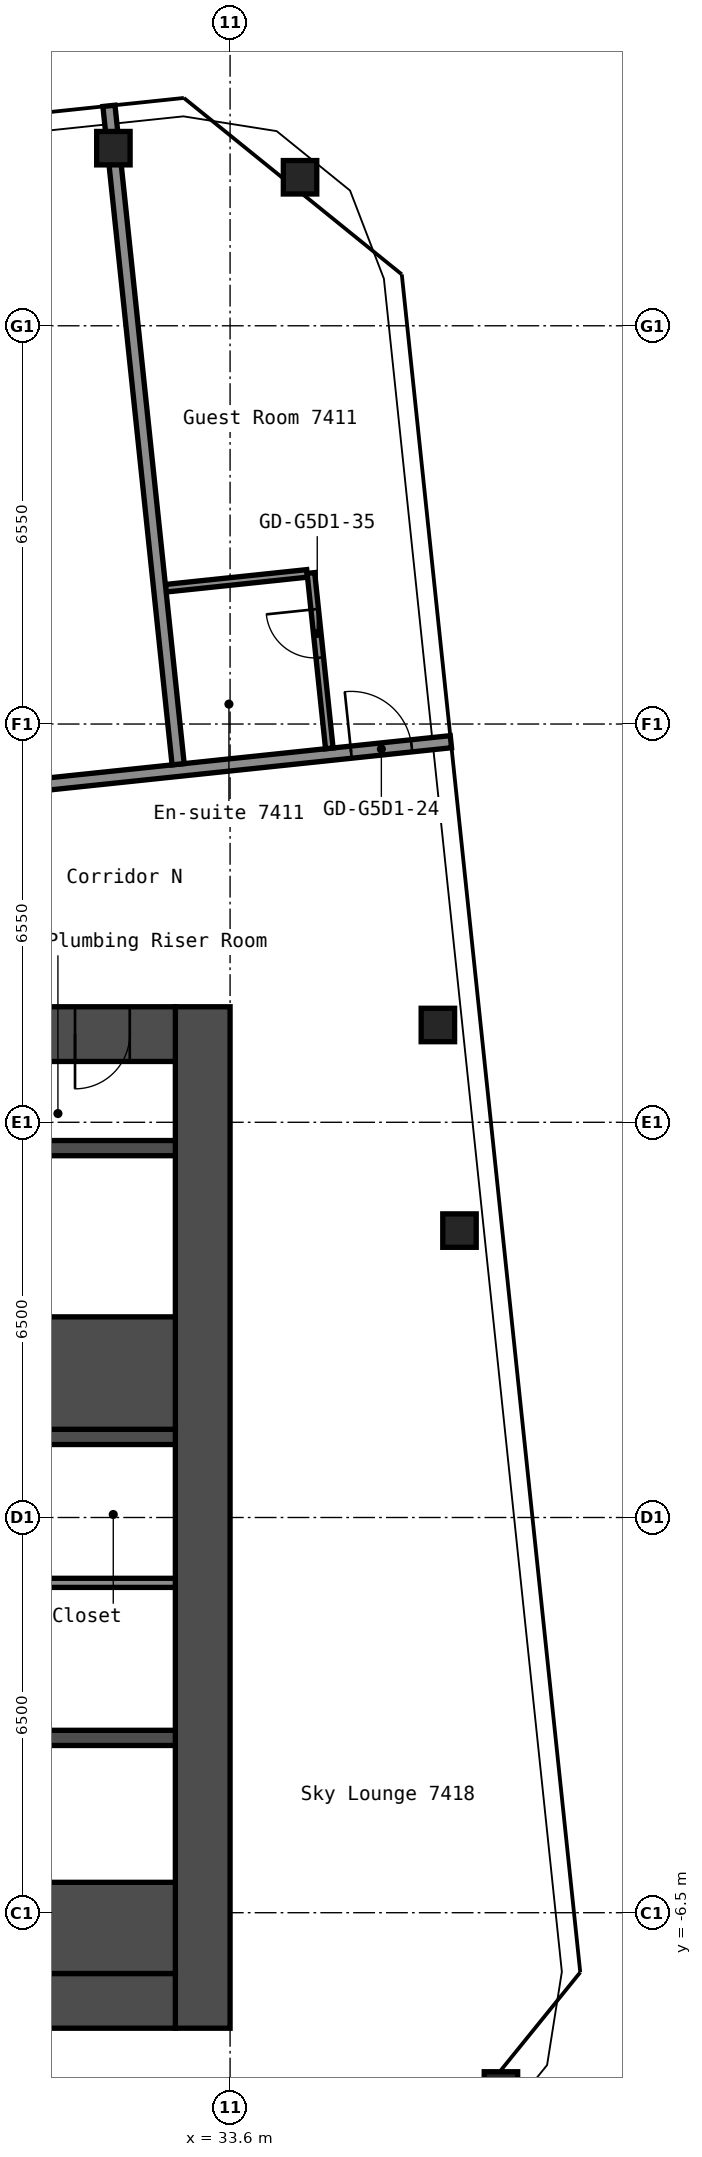
"""IFC4 building model, lengths in metres.
Left out: names, types, materials, properties, quantities, classifications, styles, units other than length and angle.
Written with IfcOpenShell. Run it as: python <this file> out.ifc"""

import sys

from ifc_helpers import new_model, si_unit, direction, frame, frame_2d, origin, origin_2d, place, context, subcontext, project, spatial, rectangle, hollow_rectangle, extrude, element, fill, save


model = new_model("IFC4")
c1 = context("Model", 3, precision=1e-05, world=origin(), true_north=direction((0.0, 1.0)))
c2 = subcontext(c1, "Body", "Model", "MODEL_VIEW")
j1 = project(units=[si_unit("LENGTHUNIT", "METRE"), si_unit("PLANEANGLEUNIT", "RADIAN")], contexts=[c1])
p1 = place(None, origin())
s1 = spatial("IfcSite", under=j1, at=p1, CompositionType="ELEMENT")
p2 = place(p1, origin())
s2 = spatial("IfcBuilding", under=s1, at=p2, CompositionType="ELEMENT")
p3 = place(p2, frame((0.0, 0.0, 261.4)))
s3 = spatial("IfcBuildingStorey", under=s2, at=p3, CompositionType="ELEMENT", Elevation=261.4)
for number, where, z_axis, x_axis in (
    (1, (31.681, 22.521, 0.0), (0.0, 0.0, 1.0), (1.0, 0.0, 0.0)),
    (2, (38.054, -9.39, 0.0), (0.0, 0.0, 1.0), (1.0, 0.0, 0.0)),
    (3, (37.373, 4.719, 0.0), (0.0, 0.0, 1.0), (1.0, 0.0, 0.0)),
    (4, (37.017, 8.1, 0.0), (0.0, 0.0, 1.0), (1.0, 0.0, 0.0)),
    (5, (34.751, 22.042, 0.0), (0.0, 0.0, 1.0), (1.0, 0.0, 0.0)),
):
    element("IfcColumn", number, at=place(p3, frame(where, z_axis=z_axis, x_axis=x_axis)), inside=s3, PredefinedType="COLUMN", context=c2, shape_type="SweptSolid", body=[
        extrude(hollow_rectangle(XDim=0.55, YDim=0.55, WallThickness=0.022, InnerFilletRadius=0.033, OuterFilletRadius=0.055, at=origin_2d()), origin(), (0.0, 0.0, 1.0), 2.75),
    ])
p4 = place(p3, frame((33.15, -8.4, 0.0), z_axis=(0.0, 0.0, 1.0), x_axis=(0.0, 1.0, 0.0)))
e6 = element("IfcWall", 6, at=p4, inside=s3, PredefinedType="SHEAR", context=c2, shape_type="SweptSolid", body=[
    extrude(rectangle(XDim=16.8, YDim=0.9, at=frame_2d((8.4, 0.0))), origin(), (0.0, 0.0, 1.0), 2.75),
])
p5 = place(p3, frame((17.7, 7.95, 0.0), z_axis=(0.0, 0.0, 1.0), x_axis=(1.0, 0.0, 0.0)))
e7 = element("IfcWall", 7, at=p5, inside=s3, PredefinedType="SHEAR", context=c2, shape_type="SweptSolid", body=[
    extrude(rectangle(XDim=15.0, YDim=0.9, at=frame_2d((7.5, 0.0))), origin(), (0.0, 0.0, 1.0), 2.75),
])
p6 = place(p5, frame((10.4, 0.0, 0.0)))
e8 = element("IfcOpeningElement", 8, at=p6, cuts=e7, PredefinedType="OPENING", context=c2, shape_type="SweptSolid", body=[
    extrude(rectangle(XDim=1.2, YDim=2.1, at=frame_2d((0.6, 1.05))), frame((0.0, 0.46, 0.0), z_axis=(0.0, -1.0, 0.0), x_axis=(1.0, 0.0, 0.0)), (0.0, 0.0, 1.0), 0.92),
])
p7 = place(p5, frame((13.35, 0.0, 0.0)))
e9 = element("IfcOpeningElement", 9, at=p7, cuts=e7, PredefinedType="OPENING", context=c2, shape_type="SweptSolid", body=[
    extrude(rectangle(XDim=0.9, YDim=2.1, at=frame_2d((0.45, 1.05))), frame((0.0, 0.46, 0.0), z_axis=(0.0, -1.0, 0.0), x_axis=(1.0, 0.0, 0.0)), (0.0, 0.0, 1.0), 0.92),
])
p8 = place(p3, frame((17.7, -7.95, 0.0), z_axis=(0.0, 0.0, 1.0), x_axis=(1.0, 0.0, 0.0)))
e10 = element("IfcWall", 10, at=p8, inside=s3, PredefinedType="SHEAR", context=c2, shape_type="SweptSolid", body=[
    extrude(rectangle(XDim=15.0, YDim=0.9, at=frame_2d((7.5, 0.0))), origin(), (0.0, 0.0, 1.0), 2.75),
])
p9 = place(p8, frame((2.55, 0.0, 0.0)))
e11 = element("IfcOpeningElement", 11, at=p9, cuts=e10, PredefinedType="OPENING", context=c2, shape_type="SweptSolid", body=[
    extrude(rectangle(XDim=1.0, YDim=2.1, at=frame_2d((0.5, 1.05))), frame((0.0, 0.46, 0.0), z_axis=(0.0, -1.0, 0.0), x_axis=(1.0, 0.0, 0.0)), (0.0, 0.0, 1.0), 0.92),
])
p10 = place(p3, frame((27.65, 1.325, 0.0), z_axis=(0.0, 0.0, 1.0), x_axis=(1.0, 0.0, 0.0)))
e12 = element("IfcWall", 12, at=p10, inside=s3, PredefinedType="SHEAR", context=c2, shape_type="SweptSolid", body=[
    extrude(rectangle(XDim=5.05, YDim=0.25, at=frame_2d((2.525, 0.0))), origin(), (0.0, 0.0, 1.0), 2.75),
])
p11 = place(p10, frame((0.55, 0.0, 0.0)))
e13 = element("IfcOpeningElement", 13, at=p11, cuts=e12, PredefinedType="OPENING", context=c2, shape_type="SweptSolid", body=[
    extrude(rectangle(XDim=1.2, YDim=2.1, at=frame_2d((0.6, 1.05))), frame((0.0, 0.135, 0.0), z_axis=(0.0, -1.0, 0.0), x_axis=(1.0, 0.0, 0.0)), (0.0, 0.0, 1.0), 0.27),
])
p12 = place(p3, frame((30.3, 2.375, 0.0), z_axis=(0.0, 0.0, 1.0), x_axis=(1.0, 0.0, 0.0)))
e14 = element("IfcWall", 14, at=p12, inside=s3, PredefinedType="SHEAR", context=c2, shape_type="SweptSolid", body=[
    extrude(rectangle(XDim=2.4, YDim=1.85, at=frame_2d((1.2, 0.0))), origin(), (0.0, 0.0, 1.0), 2.75),
])
p13 = place(p3, frame((30.3, 6.075, 0.0), z_axis=(0.0, 0.0, 1.0), x_axis=(1.0, 0.0, 0.0)))
e15 = element("IfcWall", 15, at=p13, inside=s3, PredefinedType="SHEAR", context=c2, shape_type="SweptSolid", body=[
    extrude(rectangle(XDim=2.4, YDim=0.25, at=frame_2d((1.2, 0.0))), origin(), (0.0, 0.0, 1.0), 2.75),
])
p14 = place(p3, frame((28.15, -3.625, 0.0), z_axis=(0.0, 0.0, 1.0), x_axis=(1.0, 0.0, 0.0)))
e16 = element("IfcWall", 16, at=p14, inside=s3, PredefinedType="SHEAR", context=c2, shape_type="SweptSolid", body=[
    extrude(rectangle(XDim=4.55, YDim=0.25, at=frame_2d((2.275, 0.0))), origin(), (0.0, 0.0, 1.0), 2.75),
])
p15 = place(p3, frame((28.15, -6.75, 0.0), z_axis=(0.0, 0.0, 1.0), x_axis=(1.0, 0.0, 0.0)))
e17 = element("IfcWall", 17, at=p15, inside=s3, PredefinedType="SHEAR", context=c2, shape_type="SweptSolid", body=[
    extrude(rectangle(XDim=4.55, YDim=1.5, at=frame_2d((2.275, 0.0))), origin(), (0.0, 0.0, 1.0), 2.75),
])
p16 = place(p3, frame((29.7, -1.075, 0.0), z_axis=(0.0, 0.0, 1.0), x_axis=(1.0, 0.0, 0.0)))
e18 = element("IfcWall", 18, at=p16, inside=s3, PredefinedType="PARTITIONING", context=c2, shape_type="SweptSolid", body=[
    extrude(rectangle(XDim=3.0, YDim=0.15, at=frame_2d((1.5, 0.0))), origin(), (0.0, 0.0, 1.0), 2.75),
])
p17 = place(p3, frame((16.048, 10.533, 0.0), z_axis=(0.0, 0.0, 1.0), x_axis=(0.994522460242, 0.104523088709, 0.0)))
e19 = element("IfcWall", 19, at=p17, inside=s3, PredefinedType="PARTITIONING", context=c2, shape_type="SweptSolid", body=[
    extrude(rectangle(XDim=21.3, YDim=0.2, at=frame_2d((10.65, 0.0))), origin(), (0.0, 0.0, 1.0), 2.75),
])
p18 = place(p17, frame((3.4, 0.0, 0.0)))
e20 = element("IfcOpeningElement", 20, at=p18, cuts=e19, PredefinedType="OPENING", context=c2, shape_type="SweptSolid", body=[
    extrude(rectangle(XDim=1.6, YDim=2.1, at=frame_2d((0.8, 1.05))), frame((0.0, 0.11, 0.0), z_axis=(0.0, -1.0, 0.0), x_axis=(1.0, 0.0, 0.0)), (0.0, 0.0, 1.0), 0.22),
])
p19 = place(p17, frame((11.8, 0.0, 0.0)))
e21 = element("IfcOpeningElement", 21, at=p19, cuts=e19, PredefinedType="OPENING", context=c2, shape_type="SweptSolid", body=[
    extrude(rectangle(XDim=1.6, YDim=2.1, at=frame_2d((0.8, 1.05))), frame((0.0, 0.11, 0.0), z_axis=(0.0, -1.0, 0.0), x_axis=(1.0, 0.0, 0.0)), (0.0, 0.0, 1.0), 0.22),
])
p20 = place(p17, frame((19.65, 0.0, 0.0)))
e22 = element("IfcOpeningElement", 22, at=p20, cuts=e19, PredefinedType="OPENING", context=c2, shape_type="SweptSolid", body=[
    extrude(rectangle(XDim=1.0, YDim=2.1, at=frame_2d((0.5, 1.05))), frame((0.0, 0.11, 0.0), z_axis=(0.0, -1.0, 0.0), x_axis=(1.0, 0.0, 0.0)), (0.0, 0.0, 1.0), 0.22),
])
p21 = place(p3, frame((32.542, 15.283, 0.0), z_axis=(0.0, 0.0, 1.0), x_axis=(0.994519751088, 0.104548862722, 0.0)))
e23 = element("IfcWall", 23, at=p21, inside=s3, PredefinedType="PARTITIONING", context=c2, shape_type="SweptSolid", body=[
    extrude(rectangle(XDim=2.337, YDim=0.125, at=frame_2d((1.169, 0.0))), origin(), (0.0, 0.0, 1.0), 2.75),
])
p22 = place(p3, frame((32.746, 12.389, 0.0), z_axis=(0.0, 0.0, 1.0), x_axis=(-0.104533048416, 0.994521413439, 0.0)))
e24 = element("IfcWall", 24, at=p22, inside=s3, PredefinedType="PARTITIONING", context=c2, shape_type="SweptSolid", body=[
    extrude(rectangle(XDim=10.888, YDim=0.2, at=frame_2d((5.444, 0.0))), origin(), (0.0, 0.0, 1.0), 2.75),
])
p23 = place(p3, frame((35.232, 12.65, 0.0), z_axis=(0.0, 0.0, 1.0), x_axis=(-0.104470059912, 0.994528032074, 0.0)))
e25 = element("IfcWall", 25, at=p23, inside=s3, PredefinedType="PARTITIONING", context=c2, shape_type="SweptSolid", body=[
    extrude(rectangle(XDim=2.9, YDim=0.125, at=frame_2d((1.45, 0.0))), origin(), (0.0, 0.0, 1.0), 2.75),
])
p24 = place(p23, frame((1.5, 0.0, 0.0)))
e26 = element("IfcOpeningElement", 26, at=p24, cuts=e25, PredefinedType="OPENING", context=c2, shape_type="SweptSolid", body=[
    extrude(rectangle(XDim=0.8, YDim=2.1, at=frame_2d((0.4, 1.05))), frame((0.0, 0.073, 0.0), z_axis=(0.0, -1.0, 0.0), x_axis=(1.0, 0.0, 0.0)), (0.0, 0.0, 1.0), 0.145),
])
p25 = place(p7, origin())
e27 = element("IfcDoor", 27, at=p25, inside=s3, OperationType="SINGLE_SWING_LEFT", PredefinedType="DOOR", context=c2, shape_type="SweptSolid", body=[
    extrude(rectangle(XDim=0.9, YDim=2.1, at=frame_2d((0.45, 1.05))), frame((0.0, 0.025, 0.0), z_axis=(0.0, -1.0, 0.0), x_axis=(1.0, 0.0, 0.0)), (0.0, 0.0, 1.0), 0.05),
])
fill(e9, e27)
p26 = place(p20, origin())
e28 = element("IfcDoor", 28, at=p26, inside=s3, OperationType="SINGLE_SWING_RIGHT", PredefinedType="DOOR", context=c2, shape_type="SweptSolid", body=[
    extrude(rectangle(XDim=1.0, YDim=2.1, at=frame_2d((0.5, 1.05))), frame((0.0, 0.025, 0.0), z_axis=(0.0, -1.0, 0.0), x_axis=(1.0, 0.0, 0.0)), (0.0, 0.0, 1.0), 0.05),
])
fill(e22, e28)
p27 = place(p24, origin())
e29 = element("IfcDoor", 29, at=p27, inside=s3, OperationType="SINGLE_SWING_LEFT", PredefinedType="DOOR", context=c2, shape_type="SweptSolid", body=[
    extrude(rectangle(XDim=0.8, YDim=2.1, at=frame_2d((0.4, 1.05))), frame((0.0, 0.025, 0.0), z_axis=(0.0, -1.0, 0.0), x_axis=(1.0, 0.0, 0.0)), (0.0, 0.0, 1.0), 0.05),
])
fill(e26, e29)
save(model, sys.argv[1])
